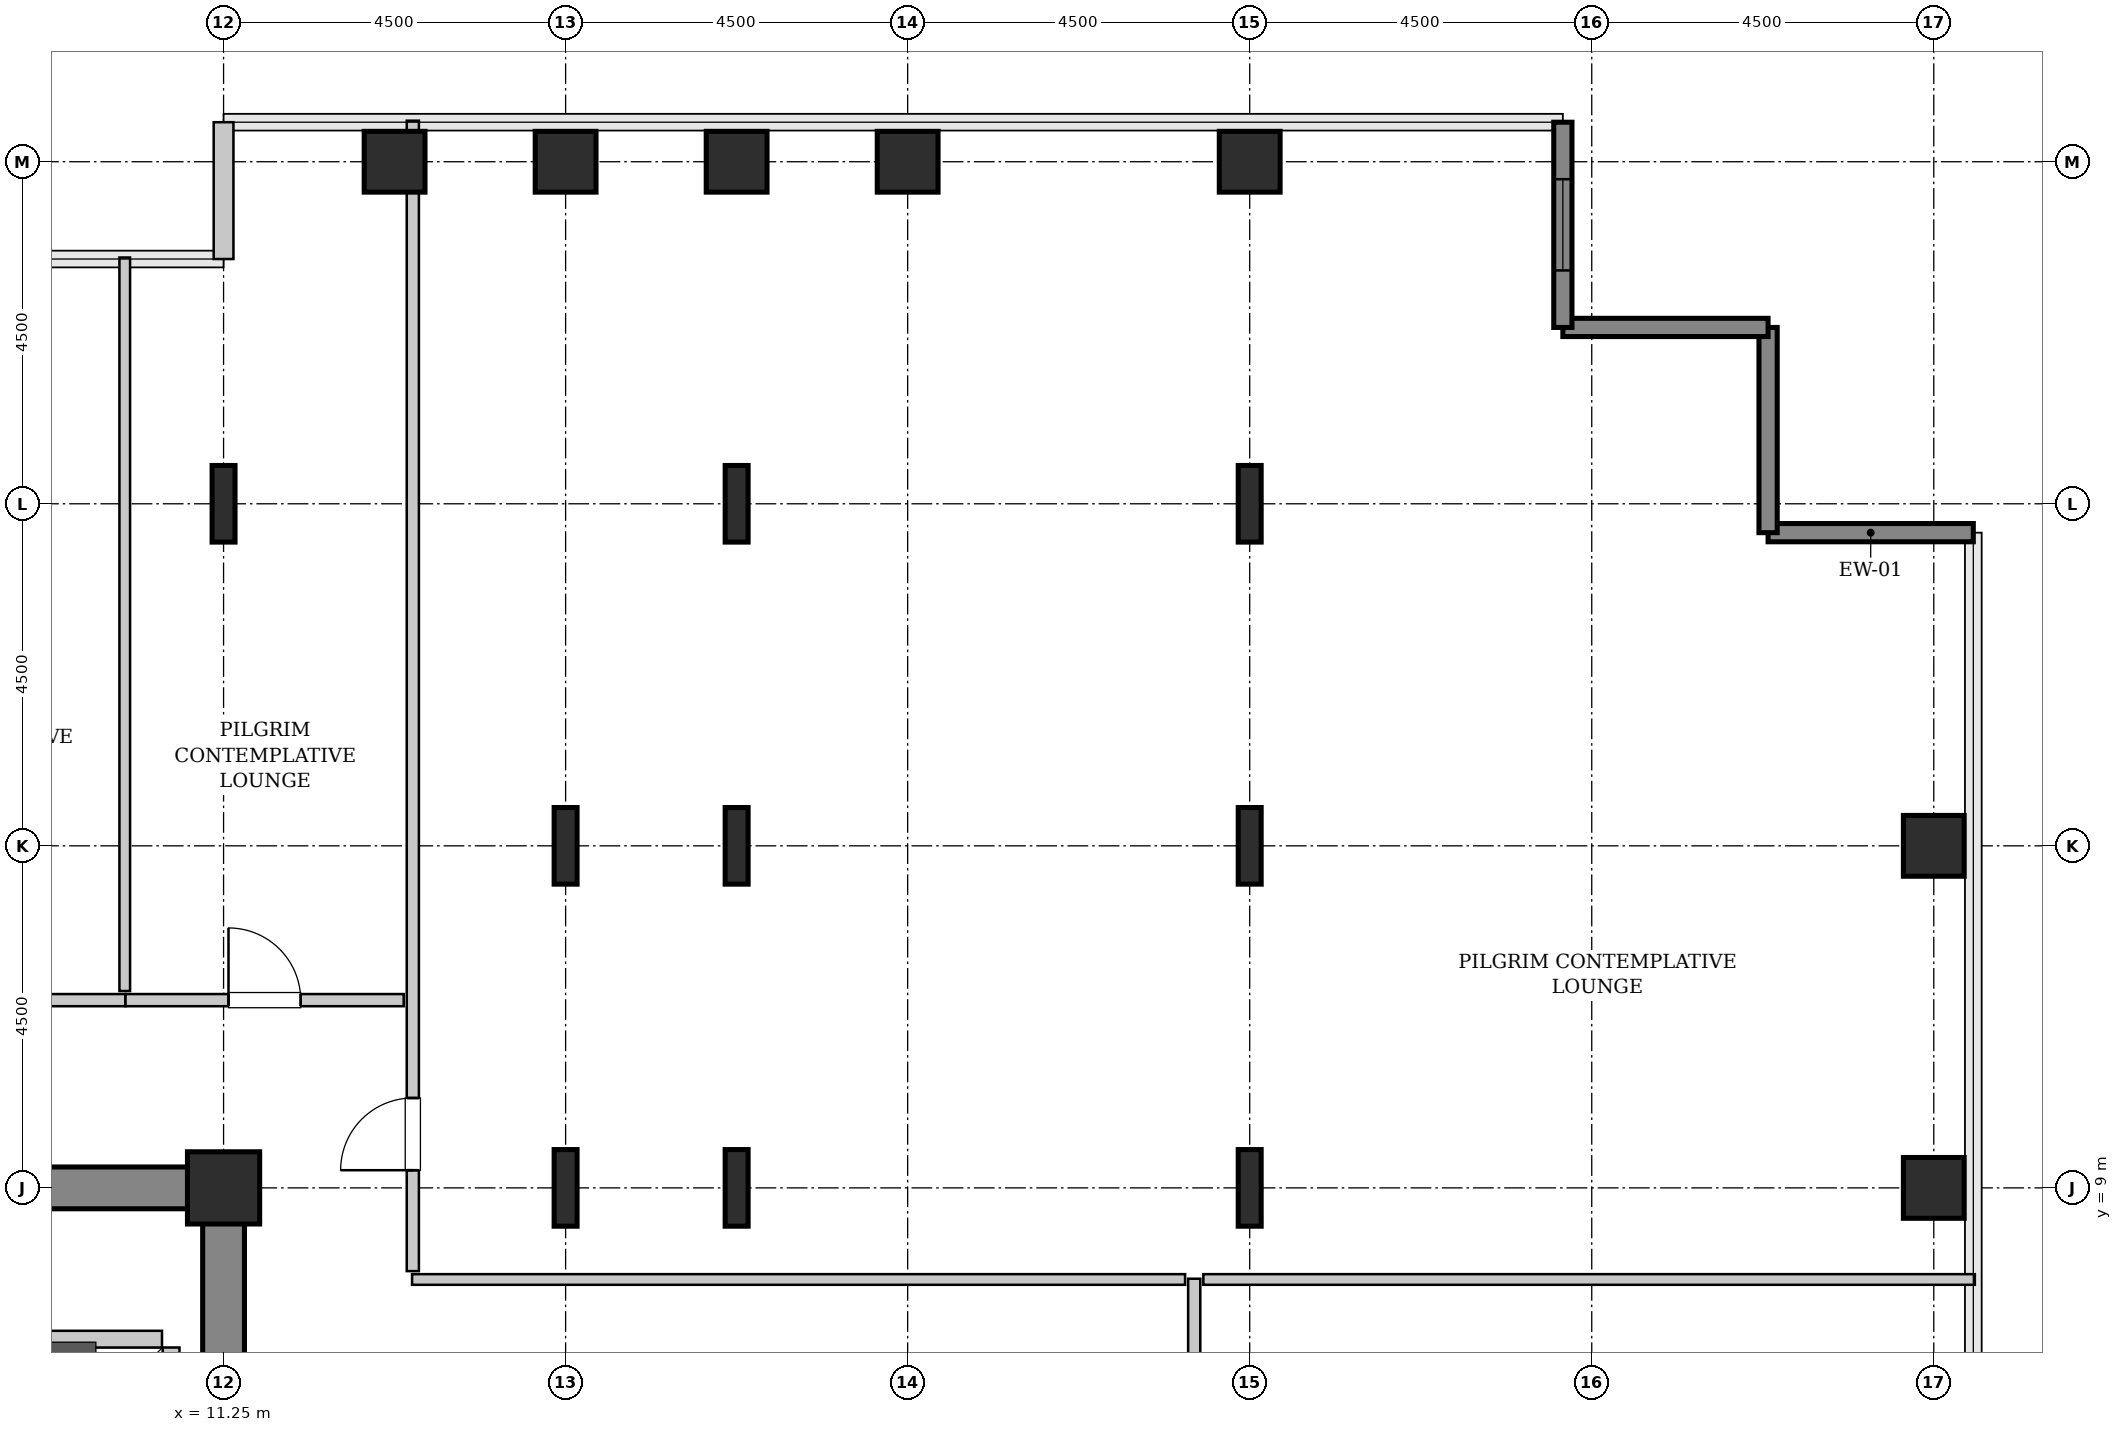
"""IFC4 building model, lengths in metres.
Left out: names, types, materials, properties, quantities, classifications, styles, units other than length and angle.
Written with IfcOpenShell. Run it as: python <this file> out.ifc"""

import sys

from ifc_helpers import new_model, si_unit, direction, frame, frame_2d, origin, origin_2d, place, context, subcontext, project, spatial, rectangle, hollow_rectangle, i_section, extrude, source, transform, mapped, element, fill, save


model = new_model("IFC4")
c1 = context("Model", 3, precision=1e-05, world=origin(), true_north=direction((0.0, 1.0)))
c2 = subcontext(c1, "Body", "Model", "MODEL_VIEW")
j1 = project(units=[si_unit("LENGTHUNIT", "METRE"), si_unit("PLANEANGLEUNIT", "RADIAN")], contexts=[c1])
p1 = place(None, origin())
s1 = spatial("IfcSite", under=j1, at=p1, CompositionType="ELEMENT")
p2 = place(p1, origin())
s2 = spatial("IfcBuilding", under=s1, at=p2, CompositionType="ELEMENT")
p3 = place(p2, frame((0.0, 0.0, 121.2)))
s3 = spatial("IfcBuildingStorey", under=s2, at=p3, CompositionType="ELEMENT", Elevation=121.2)
m1 = source(origin(), c2, "Body", "SweptSolid", [
    extrude(rectangle(XDim=9.975, YDim=0.55, at=frame_2d((4.987, 0.0))), origin(), (0.0, 0.0, 1.0), 3.8),
])
p4 = place(p3, frame((1.55, 9.0, 0.0), z_axis=(0.0, 0.0, 1.0), x_axis=(1.0, 0.0, 0.0)))
e1 = element("IfcWall", 1, at=p4, inside=s3, PredefinedType="SHEAR", context=c2, shape_type="MappedRepresentation", body=[
    mapped(m1, transform((0.0, 0.0, 0.0), x_axis=(1.0, 0.0, 0.0), y_axis=(0.0, 1.0, 0.0), z_axis=(0.0, 0.0, 1.0), scale=1.0)),
])
m2 = source(origin(), c2, "Body", "SweptSolid", [
    extrude(rectangle(XDim=7.375, YDim=0.55, at=frame_2d((3.688, 0.0))), origin(), (0.0, 0.0, 1.0), 3.8),
])
p5 = place(p3, frame((11.25, 1.35, 0.0), z_axis=(0.0, 0.0, 1.0), x_axis=(0.0, 1.0, 0.0)))
e2 = element("IfcWall", 2, at=p5, inside=s3, PredefinedType="SHEAR", context=c2, shape_type="MappedRepresentation", body=[
    mapped(m2, transform((0.0, 0.0, 0.0), x_axis=(1.0, 0.0, 0.0), y_axis=(0.0, 1.0, 0.0), z_axis=(0.0, 0.0, 1.0), scale=1.0)),
])
m3 = source(origin(), c2, "Body", "SweptSolid", [
    extrude(hollow_rectangle(XDim=0.95, YDim=0.95, WallThickness=0.045, InnerFilletRadius=0.045, OuterFilletRadius=0.09, at=origin_2d()), origin(), (0.0, 0.0, 1.0), 3.8),
])
p6 = place(p3, frame((11.25, 9.0, 0.0), z_axis=(0.0, 0.0, 1.0), x_axis=(1.0, 0.0, 0.0)))
e3 = element("IfcColumn", 3, at=p6, inside=s3, PredefinedType="COLUMN", context=c2, shape_type="MappedRepresentation", body=[
    mapped(m3, transform((0.0, 0.0, 0.0), x_axis=(1.0, 0.0, 0.0), y_axis=(0.0, 1.0, 0.0), z_axis=(0.0, 0.0, 1.0), scale=1.0)),
])
m4 = source(origin(), c2, "Body", "SweptSolid", [
    extrude(i_section(OverallWidth=0.302, OverallDepth=1.008, WebThickness=0.021, FlangeThickness=0.04, FilletRadius=0.03, at=origin_2d()), origin(), (0.0, 0.0, 1.0), 3.8),
])
p7 = place(p3, frame((11.25, 18.0, 0.0), z_axis=(0.0, 0.0, 1.0), x_axis=(1.0, 0.0, 0.0)))
e4 = element("IfcColumn", 4, at=p7, inside=s3, PredefinedType="COLUMN", context=c2, shape_type="MappedRepresentation", body=[
    mapped(m4, transform((0.0, 0.0, 0.0), x_axis=(1.0, 0.0, 0.0), y_axis=(0.0, 1.0, 0.0), z_axis=(0.0, 0.0, 1.0), scale=1.0)),
])
m5 = source(origin(), c2, "Body", "SweptSolid", [
    extrude(hollow_rectangle(XDim=0.8, YDim=0.8, WallThickness=0.04, InnerFilletRadius=0.04, OuterFilletRadius=0.08, at=origin_2d()), origin(), (0.0, 0.0, 1.0), 3.8),
])
p8 = place(p3, frame((13.5, 22.5, 0.0), z_axis=(0.0, 0.0, 1.0), x_axis=(1.0, 0.0, 0.0)))
e5 = element("IfcColumn", 5, at=p8, inside=s3, PredefinedType="COLUMN", context=c2, shape_type="MappedRepresentation", body=[
    mapped(m5, transform((0.0, 0.0, 0.0), x_axis=(1.0, 0.0, 0.0), y_axis=(0.0, 1.0, 0.0), z_axis=(0.0, 0.0, 1.0), scale=1.0)),
])
for number, where, z_axis, x_axis in (
    (6, (15.75, 9.0, 0.0), (0.0, 0.0, 1.0), (1.0, 0.0, 0.0)),
    (7, (15.75, 13.5, 0.0), (0.0, 0.0, 1.0), (1.0, 0.0, 0.0)),
):
    element("IfcColumn", number, at=place(p3, frame(where, z_axis=z_axis, x_axis=x_axis)), inside=s3, PredefinedType="COLUMN", context=c2, shape_type="MappedRepresentation", body=[
        mapped(m4, transform((0.0, 0.0, 0.0), x_axis=(1.0, 0.0, 0.0), y_axis=(0.0, 1.0, 0.0), z_axis=(0.0, 0.0, 1.0), scale=1.0)),
    ])
p9 = place(p3, frame((15.75, 22.5, 0.0), z_axis=(0.0, 0.0, 1.0), x_axis=(1.0, 0.0, 0.0)))
e8 = element("IfcColumn", 8, at=p9, inside=s3, PredefinedType="COLUMN", context=c2, shape_type="MappedRepresentation", body=[
    mapped(m5, transform((0.0, 0.0, 0.0), x_axis=(1.0, 0.0, 0.0), y_axis=(0.0, 1.0, 0.0), z_axis=(0.0, 0.0, 1.0), scale=1.0)),
])
for number, where, z_axis, x_axis in (
    (9, (18.0, 9.0, 0.0), (0.0, 0.0, 1.0), (1.0, 0.0, 0.0)),
    (10, (18.0, 13.5, 0.0), (0.0, 0.0, 1.0), (1.0, 0.0, 0.0)),
    (11, (18.0, 18.0, 0.0), (0.0, 0.0, 1.0), (1.0, 0.0, 0.0)),
):
    element("IfcColumn", number, at=place(p3, frame(where, z_axis=z_axis, x_axis=x_axis)), inside=s3, PredefinedType="COLUMN", context=c2, shape_type="MappedRepresentation", body=[
        mapped(m4, transform((0.0, 0.0, 0.0), x_axis=(1.0, 0.0, 0.0), y_axis=(0.0, 1.0, 0.0), z_axis=(0.0, 0.0, 1.0), scale=1.0)),
    ])
for number, where, z_axis, x_axis in (
    (12, (18.0, 22.5, 0.0), (0.0, 0.0, 1.0), (1.0, 0.0, 0.0)),
    (13, (20.25, 22.5, 0.0), (0.0, 0.0, 1.0), (1.0, 0.0, 0.0)),
):
    element("IfcColumn", number, at=place(p3, frame(where, z_axis=z_axis, x_axis=x_axis)), inside=s3, PredefinedType="COLUMN", context=c2, shape_type="MappedRepresentation", body=[
        mapped(m5, transform((0.0, 0.0, 0.0), x_axis=(1.0, 0.0, 0.0), y_axis=(0.0, 1.0, 0.0), z_axis=(0.0, 0.0, 1.0), scale=1.0)),
    ])
for number, where, z_axis, x_axis in (
    (14, (24.75, 9.0, 0.0), (0.0, 0.0, 1.0), (1.0, 0.0, 0.0)),
    (15, (24.75, 13.5, 0.0), (0.0, 0.0, 1.0), (1.0, 0.0, 0.0)),
    (16, (24.75, 18.0, 0.0), (0.0, 0.0, 1.0), (1.0, 0.0, 0.0)),
):
    element("IfcColumn", number, at=place(p3, frame(where, z_axis=z_axis, x_axis=x_axis)), inside=s3, PredefinedType="COLUMN", context=c2, shape_type="MappedRepresentation", body=[
        mapped(m4, transform((0.0, 0.0, 0.0), x_axis=(1.0, 0.0, 0.0), y_axis=(0.0, 1.0, 0.0), z_axis=(0.0, 0.0, 1.0), scale=1.0)),
    ])
for number, where, z_axis, x_axis in (
    (17, (24.75, 22.5, 0.0), (0.0, 0.0, 1.0), (1.0, 0.0, 0.0)),
    (18, (33.75, 9.0, 0.0), (0.0, 0.0, 1.0), (1.0, 0.0, 0.0)),
    (19, (33.75, 13.5, 0.0), (0.0, 0.0, 1.0), (1.0, 0.0, 0.0)),
):
    element("IfcColumn", number, at=place(p3, frame(where, z_axis=z_axis, x_axis=x_axis)), inside=s3, PredefinedType="COLUMN", context=c2, shape_type="MappedRepresentation", body=[
        mapped(m5, transform((0.0, 0.0, 0.0), x_axis=(1.0, 0.0, 0.0), y_axis=(0.0, 1.0, 0.0), z_axis=(0.0, 0.0, 1.0), scale=1.0)),
    ])
m6 = source(origin(), c2, "Body", "SweptSolid", [
    extrude(rectangle(XDim=2.7, YDim=0.24, at=frame_2d((1.35, 0.0))), origin(), (0.0, 0.0, 1.0), 3.55),
])
for number, where, z_axis, x_axis in (
    (20, (34.27, 17.62, 0.0), (0.0, 0.0, 1.0), (-1.0, 0.0, 0.0)),
    (21, (31.57, 17.62, 0.0), (0.0, 0.0, 1.0), (0.0, 1.0, 0.0)),
    (22, (31.57, 20.32, 0.0), (0.0, 0.0, 1.0), (-1.0, 0.0, 0.0)),
):
    element("IfcWall", number, at=place(p3, frame(where, z_axis=z_axis, x_axis=x_axis)), inside=s3, PredefinedType="SHEAR", context=c2, shape_type="MappedRepresentation", body=[
        mapped(m6, transform((0.0, 0.0, 0.0), x_axis=(1.0, 0.0, 0.0), y_axis=(0.0, 1.0, 0.0), z_axis=(0.0, 0.0, 1.0), scale=1.0)),
    ])
p10 = place(p3, frame((28.87, 20.32, 0.0), z_axis=(0.0, 0.0, 1.0), x_axis=(0.0, 1.0, 0.0)))
e23 = element("IfcWall", 23, at=p10, inside=s3, PredefinedType="SHEAR", context=c2, shape_type="MappedRepresentation", body=[
    mapped(m6, transform((0.0, 0.0, 0.0), x_axis=(1.0, 0.0, 0.0), y_axis=(0.0, 1.0, 0.0), z_axis=(0.0, 0.0, 1.0), scale=1.0)),
])
p11 = place(p10, frame((0.75, 0.0, 0.85)))
e24 = element("IfcOpeningElement", 24, at=p11, cuts=e23, PredefinedType="OPENING", context=c2, shape_type="SweptSolid", body=[
    extrude(rectangle(XDim=1.2, YDim=1.8, at=frame_2d((0.6, 0.9))), frame((0.0, 0.13, 0.0), z_axis=(0.0, -1.0, 0.0), x_axis=(1.0, 0.0, 0.0)), (0.0, 0.0, 1.0), 0.26),
])
m7 = source(origin(), c2, "Body", "SweptSolid", [
    extrude(rectangle(XDim=1.8, YDim=0.26, at=frame_2d((0.9, 0.0))), origin(), (0.0, 0.0, 1.0), 3.55),
])
p12 = place(p3, frame((11.25, 23.02, 0.0), z_axis=(0.0, 0.0, 1.0), x_axis=(0.0, -1.0, 0.0)))
e25 = element("IfcWall", 25, at=p12, inside=s3, PredefinedType="SOLIDWALL", context=c2, shape_type="MappedRepresentation", body=[
    mapped(m7, transform((0.0, 0.0, 0.0), x_axis=(1.0, 0.0, 0.0), y_axis=(0.0, 1.0, 0.0), z_axis=(0.0, 0.0, 1.0), scale=1.0)),
])
m8 = source(origin(), c2, "Body", "SweptSolid", [
    extrude(rectangle(XDim=5.45, YDim=0.22, at=frame_2d((2.725, 0.0))), origin(), (0.0, 0.0, 1.0), 3.535),
])
p13 = place(p3, frame((10.56, 1.45, 0.0), z_axis=(0.0, 0.0, 1.0), x_axis=(0.0, 1.0, 0.0)))
e26 = element("IfcWall", 26, at=p13, inside=s3, PredefinedType="SOLIDWALL", context=c2, shape_type="MappedRepresentation", body=[
    mapped(m8, transform((0.0, 0.0, 0.0), x_axis=(1.0, 0.0, 0.0), y_axis=(0.0, 1.0, 0.0), z_axis=(0.0, 0.0, 1.0), scale=1.0)),
])
m9 = source(origin(), c2, "Body", "SweptSolid", [
    extrude(rectangle(XDim=2.78, YDim=0.22, at=frame_2d((1.39, 0.0))), origin(), (0.0, 0.0, 1.0), 3.535),
])
p14 = place(p3, frame((10.44, 7.01, 0.0), z_axis=(0.0, 0.0, 1.0), x_axis=(-1.0, 0.0, 0.0)))
e27 = element("IfcWall", 27, at=p14, inside=s3, PredefinedType="SOLIDWALL", context=c2, shape_type="MappedRepresentation", body=[
    mapped(m9, transform((0.0, 0.0, 0.0), x_axis=(1.0, 0.0, 0.0), y_axis=(0.0, 1.0, 0.0), z_axis=(0.0, 0.0, 1.0), scale=1.0)),
])
m10 = source(origin(), c2, "Body", "SweptSolid", [
    extrude(rectangle(XDim=15.5, YDim=0.16, at=frame_2d((7.75, 0.0))), origin(), (0.0, 0.0, 1.0), 3.535),
])
p15 = place(p3, frame((24.02, -7.695, 0.0), z_axis=(0.0, 0.0, 1.0), x_axis=(0.0, 1.0, 0.0)))
e28 = element("IfcWall", 28, at=p15, inside=s3, PredefinedType="PARTITIONING", context=c2, shape_type="MappedRepresentation", body=[
    mapped(m10, transform((0.0, 0.0, 0.0), x_axis=(1.0, 0.0, 0.0), y_axis=(0.0, 1.0, 0.0), z_axis=(0.0, 0.0, 1.0), scale=1.0)),
])
p16 = place(p15, frame((9.47, 0.0, 0.0)))
e29 = element("IfcOpeningElement", 29, at=p16, cuts=e28, PredefinedType="OPENING", context=c2, shape_type="SweptSolid", body=[
    extrude(rectangle(XDim=0.95, YDim=2.1, at=frame_2d((0.475, 1.05))), frame((0.0, 0.09, 0.0), z_axis=(0.0, -1.0, 0.0), x_axis=(1.0, 0.0, 0.0)), (0.0, 0.0, 1.0), 0.18),
])
m11 = source(origin(), c2, "Body", "SweptSolid", [
    extrude(rectangle(XDim=10.17, YDim=0.14, at=frame_2d((5.085, 0.0))), origin(), (0.0, 0.0, 1.0), 3.535),
])
p17 = place(p3, frame((13.73, 7.795, 0.0), z_axis=(0.0, 0.0, 1.0), x_axis=(1.0, 0.0, 0.0)))
e30 = element("IfcWall", 30, at=p17, inside=s3, PredefinedType="PARTITIONING", context=c2, shape_type="MappedRepresentation", body=[
    mapped(m11, transform((0.0, 0.0, 0.0), x_axis=(1.0, 0.0, 0.0), y_axis=(0.0, 1.0, 0.0), z_axis=(0.0, 0.0, 1.0), scale=1.0)),
])
m12 = source(origin(), c2, "Body", "SweptSolid", [
    extrude(rectangle(XDim=10.15, YDim=0.14, at=frame_2d((5.075, 0.0))), origin(), (0.0, 0.0, 1.0), 3.535),
])
p18 = place(p3, frame((24.14, 7.795, 0.0), z_axis=(0.0, 0.0, 1.0), x_axis=(1.0, 0.0, 0.0)))
e31 = element("IfcWall", 31, at=p18, inside=s3, PredefinedType="PARTITIONING", context=c2, shape_type="MappedRepresentation", body=[
    mapped(m12, transform((0.0, 0.0, 0.0), x_axis=(1.0, 0.0, 0.0), y_axis=(0.0, 1.0, 0.0), z_axis=(0.0, 0.0, 1.0), scale=1.0)),
])
m13 = source(origin(), c2, "Body", "SweptSolid", [
    extrude(rectangle(XDim=15.135, YDim=0.16, at=frame_2d((7.567, 0.0))), origin(), (0.0, 0.0, 1.0), 3.535),
])
p19 = place(p3, frame((13.74, 7.905, 0.0), z_axis=(0.0, 0.0, 1.0), x_axis=(0.0, 1.0, 0.0)))
e32 = element("IfcWall", 32, at=p19, inside=s3, PredefinedType="PARTITIONING", context=c2, shape_type="MappedRepresentation", body=[
    mapped(m13, transform((0.0, 0.0, 0.0), x_axis=(1.0, 0.0, 0.0), y_axis=(0.0, 1.0, 0.0), z_axis=(0.0, 0.0, 1.0), scale=1.0)),
])
p20 = place(p19, frame((1.327, 0.0, 0.0)))
e33 = element("IfcOpeningElement", 33, at=p20, cuts=e32, PredefinedType="OPENING", context=c2, shape_type="SweptSolid", body=[
    extrude(rectangle(XDim=0.95, YDim=2.1, at=frame_2d((0.475, 1.05))), frame((0.0, 0.09, 0.0), z_axis=(0.0, -1.0, 0.0), x_axis=(1.0, 0.0, 0.0)), (0.0, 0.0, 1.0), 0.18),
])
m14 = source(origin(), c2, "Body", "SweptSolid", [
    extrude(rectangle(XDim=3.765, YDim=0.16, at=frame_2d((1.882, 0.0))), origin(), (0.0, 0.0, 1.0), 3.535),
])
p21 = place(p3, frame((6.195, 11.47, 0.0), z_axis=(0.0, 0.0, 1.0), x_axis=(1.0, 0.0, 0.0)))
e34 = element("IfcWall", 34, at=p21, inside=s3, PredefinedType="PARTITIONING", context=c2, shape_type="MappedRepresentation", body=[
    mapped(m14, transform((0.0, 0.0, 0.0), x_axis=(1.0, 0.0, 0.0), y_axis=(0.0, 1.0, 0.0), z_axis=(0.0, 0.0, 1.0), scale=1.0)),
])
p22 = place(p21, frame((1.407, 0.0, 0.0)))
e35 = element("IfcOpeningElement", 35, at=p22, cuts=e34, PredefinedType="OPENING", context=c2, shape_type="SweptSolid", body=[
    extrude(rectangle(XDim=0.95, YDim=2.1, at=frame_2d((0.475, 1.05))), frame((0.0, 0.09, 0.0), z_axis=(0.0, -1.0, 0.0), x_axis=(1.0, 0.0, 0.0)), (0.0, 0.0, 1.0), 0.18),
])
m15 = source(origin(), c2, "Body", "SweptSolid", [
    extrude(rectangle(XDim=9.65, YDim=0.14, at=frame_2d((4.825, 0.0))), origin(), (0.0, 0.0, 1.0), 3.535),
])
p23 = place(p3, frame((9.95, 11.59, 0.0), z_axis=(0.0, 0.0, 1.0), x_axis=(0.0, 1.0, 0.0)))
e36 = element("IfcWall", 36, at=p23, inside=s3, PredefinedType="PARTITIONING", context=c2, shape_type="MappedRepresentation", body=[
    mapped(m15, transform((0.0, 0.0, 0.0), x_axis=(1.0, 0.0, 0.0), y_axis=(0.0, 1.0, 0.0), z_axis=(0.0, 0.0, 1.0), scale=1.0)),
])
m16 = source(origin(), c2, "Body", "SweptSolid", [
    extrude(rectangle(XDim=3.66, YDim=0.16, at=frame_2d((1.83, 0.0))), origin(), (0.0, 0.0, 1.0), 3.535),
])
p24 = place(p3, frame((9.96, 11.47, 0.0), z_axis=(0.0, 0.0, 1.0), x_axis=(1.0, 0.0, 0.0)))
e37 = element("IfcWall", 37, at=p24, inside=s3, PredefinedType="PARTITIONING", context=c2, shape_type="MappedRepresentation", body=[
    mapped(m16, transform((0.0, 0.0, 0.0), x_axis=(1.0, 0.0, 0.0), y_axis=(0.0, 1.0, 0.0), z_axis=(0.0, 0.0, 1.0), scale=1.0)),
])
p25 = place(p24, frame((1.355, 0.0, 0.0)))
e38 = element("IfcOpeningElement", 38, at=p25, cuts=e37, PredefinedType="OPENING", context=c2, shape_type="SweptSolid", body=[
    extrude(rectangle(XDim=0.95, YDim=2.1, at=frame_2d((0.475, 1.05))), frame((0.0, 0.09, 0.0), z_axis=(0.0, -1.0, 0.0), x_axis=(1.0, 0.0, 0.0)), (0.0, 0.0, 1.0), 0.18),
])
m17 = source(origin(), c2, "Body", "SweptSolid", [
    extrude(rectangle(XDim=1.2, YDim=1.8, at=frame_2d((0.6, 0.9))), frame((0.0, 0.03, 0.0), z_axis=(0.0, -1.0, 0.0), x_axis=(1.0, 0.0, 0.0)), (0.0, 0.0, 1.0), 0.06),
])
p26 = place(p11, origin())
e39 = element("IfcWindow", 39, at=p26, inside=s3, PartitioningType="SINGLE_PANEL", PredefinedType="WINDOW", context=c2, shape_type="MappedRepresentation", body=[
    mapped(m17, transform((0.0, 0.0, 0.0), x_axis=(1.0, 0.0, 0.0), y_axis=(0.0, 1.0, 0.0), z_axis=(0.0, 0.0, 1.0), scale=1.0)),
])
fill(e24, e39)
m18 = source(origin(), c2, "Body", "SweptSolid", [
    extrude(rectangle(XDim=0.95, YDim=2.1, at=frame_2d((0.475, 1.05))), frame((0.0, 0.025, 0.0), z_axis=(0.0, -1.0, 0.0), x_axis=(1.0, 0.0, 0.0)), (0.0, 0.0, 1.0), 0.05),
])
p27 = place(p20, origin())
e40 = element("IfcDoor", 40, at=p27, inside=s3, OperationType="SINGLE_SWING_LEFT", PredefinedType="DOOR", context=c2, shape_type="MappedRepresentation", body=[
    mapped(m18, transform((0.0, 0.0, 0.0), x_axis=(1.0, 0.0, 0.0), y_axis=(0.0, 1.0, 0.0), z_axis=(0.0, 0.0, 1.0), scale=1.0)),
])
fill(e33, e40)
p28 = place(p25, origin())
e41 = element("IfcDoor", 41, at=p28, inside=s3, OperationType="SINGLE_SWING_LEFT", PredefinedType="DOOR", context=c2, shape_type="MappedRepresentation", body=[
    mapped(m18, transform((0.0, 0.0, 0.0), x_axis=(1.0, 0.0, 0.0), y_axis=(0.0, 1.0, 0.0), z_axis=(0.0, 0.0, 1.0), scale=1.0)),
])
fill(e38, e41)
save(model, sys.argv[1])
